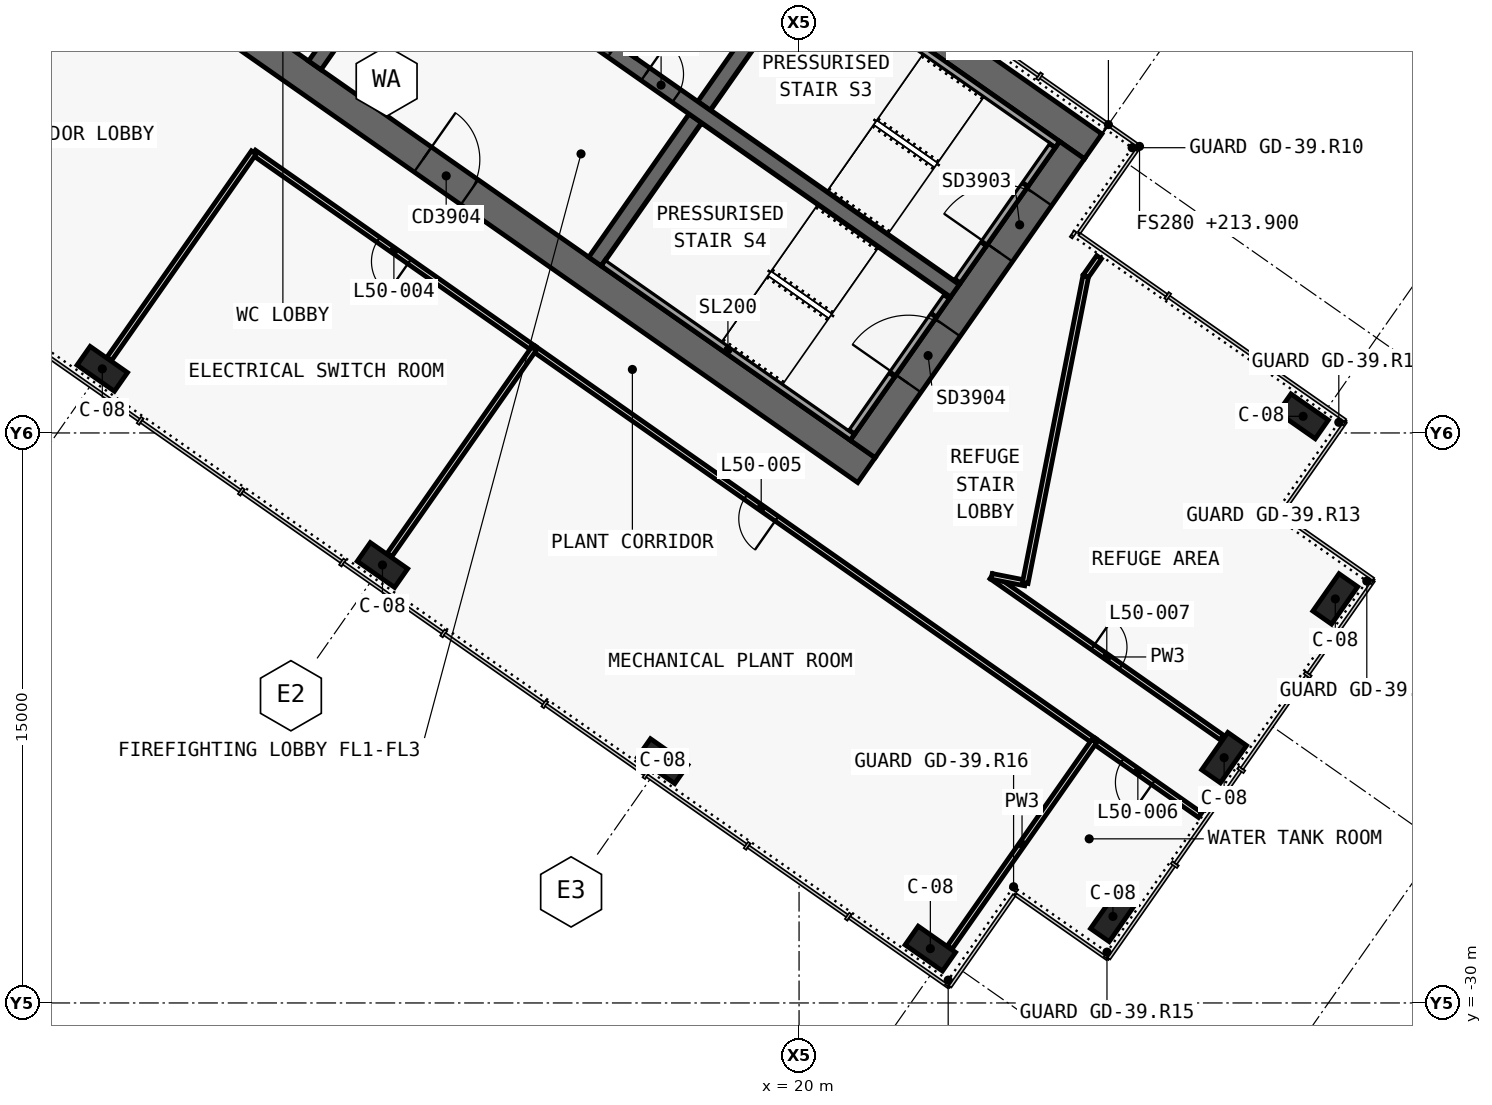
"""IFC4 building model, lengths in metres.
Left out: names, types, materials, properties, quantities, classifications, styles, units other than length and angle.
Written with IfcOpenShell. Run it as: python <this file> out.ifc"""

import sys

from ifc_helpers import new_model, si_unit, direction, frame, frame_2d, origin, origin_2d, place, context, subcontext, project, spatial, polyline, rectangle, outline, extrude, element, fill, save


model = new_model("IFC4")
c1 = context("Model", 3, precision=1e-05, world=origin(), true_north=direction((0.0, 1.0)))
c2 = subcontext(c1, "Body", "Model", "MODEL_VIEW")
j1 = project(units=[si_unit("LENGTHUNIT", "METRE"), si_unit("PLANEANGLEUNIT", "RADIAN")], contexts=[c1])
p1 = place(None, origin())
s1 = spatial("IfcSite", under=j1, at=p1, CompositionType="ELEMENT")
p2 = place(p1, origin())
s2 = spatial("IfcBuilding", under=s1, at=p2, CompositionType="ELEMENT")
p3 = place(p2, frame((0.0, 0.0, 213.9)))
s3 = spatial("IfcBuildingStorey", under=s2, at=p3, CompositionType="ELEMENT", Elevation=213.9)
p4 = place(p3, frame((-0.029, 11.984, 0.0), z_axis=(0.0, 0.0, 1.0), x_axis=(0.819151382952, -0.573577380837, 0.0)))
e1 = element("IfcWall", 1, at=p4, inside=s3, PredefinedType="SHEAR", context=c2, shape_type="SweptSolid", body=[
    extrude(outline(polyline([(33.898, 0.4), (-0.0, 0.4), (0.56, -0.4), (33.898, -0.4), (33.898, 0.4)])), origin(), (0.0, 0.0, 1.0), 5.5),
])
p5 = place(p3, frame((-0.029, -0.712, 0.0), z_axis=(0.0, 0.0, 1.0), x_axis=(0.819151758019, -0.573576845187, 0.0)))
e2 = element("IfcWall", 2, at=p5, inside=s3, PredefinedType="SHEAR", context=c2, shape_type="SweptSolid", body=[
    extrude(outline(polyline([(26.616, 0.4), (-0.0, 0.4), (0.56, -0.4), (26.616, -0.4), (26.616, 0.4)])), origin(), (0.0, 0.0, 1.0), 5.5),
])
p6 = place(p5, frame((1.166, 0.0, 0.0)))
e3 = element("IfcOpeningElement", 3, at=p6, cuts=e2, PredefinedType="OPENING", context=c2, shape_type="SweptSolid", body=[
    extrude(rectangle(XDim=1.5, YDim=2.1, at=frame_2d((0.75, 1.05))), frame((0.0, 0.41, 0.0), z_axis=(0.0, -1.0, 0.0), x_axis=(1.0, 0.0, 0.0)), (0.0, 0.0, 1.0), 0.82),
])
p7 = place(p5, frame((12.366, 0.0, 0.0)))
e4 = element("IfcOpeningElement", 4, at=p7, cuts=e2, PredefinedType="OPENING", context=c2, shape_type="SweptSolid", body=[
    extrude(rectangle(XDim=1.5, YDim=2.1, at=frame_2d((0.75, 1.05))), frame((0.0, 0.41, 0.0), z_axis=(0.0, -1.0, 0.0), x_axis=(1.0, 0.0, 0.0)), (0.0, 0.0, 1.0), 0.82),
])
p8 = place(p3, frame((21.675, -15.421, 0.0), z_axis=(0.0, 0.0, 1.0), x_axis=(0.573581815061, 0.819148278049, 0.0)))
e5 = element("IfcWall", 5, at=p8, inside=s3, PredefinedType="SHEAR", context=c2, shape_type="SweptSolid", body=[
    extrude(outline(polyline([(9.6, 0.4), (0.0, 0.4), (0.0, -0.4), (9.6, -0.4), (9.6, 0.4)])), origin(), (0.0, 0.0, 1.0), 5.5),
])
p9 = place(p8, frame((6.3, 0.0, 0.0)))
e6 = element("IfcOpeningElement", 6, at=p9, cuts=e5, PredefinedType="OPENING", context=c2, shape_type="SweptSolid", body=[
    extrude(rectangle(XDim=1.8, YDim=2.1, at=frame_2d((0.9, 1.05))), frame((0.0, 0.41, 0.0), z_axis=(0.0, -1.0, 0.0), x_axis=(1.0, 0.0, 0.0)), (0.0, 0.0, 1.0), 0.82),
])
p10 = place(p8, frame((2.1, 0.0, 0.0)))
e7 = element("IfcOpeningElement", 7, at=p10, cuts=e5, PredefinedType="OPENING", context=c2, shape_type="SweptSolid", body=[
    extrude(rectangle(XDim=1.8, YDim=2.1, at=frame_2d((0.9, 1.05))), frame((0.0, 0.41, 0.0), z_axis=(0.0, -1.0, 0.0), x_axis=(1.0, 0.0, 0.0)), (0.0, 0.0, 1.0), 0.82),
])
p11 = place(p3, frame((7.258, -5.326, 0.0), z_axis=(0.0, 0.0, 1.0), x_axis=(0.573540709186, 0.819177059558, 0.0)))
e8 = element("IfcWall", 8, at=p11, inside=s3, PredefinedType="SHEAR", context=c2, shape_type="SweptSolid", body=[
    extrude(outline(polyline([(-0.0, 0.2), (-0.0, -0.2), (4.6, -0.2), (4.6, 0.2), (-0.0, 0.2)])), origin(), (0.0, 0.0, 1.0), 5.5),
])
p12 = place(p3, frame((14.63, -10.488, 0.0), z_axis=(0.0, 0.0, 1.0), x_axis=(0.573611936273, 0.819127185829, 0.0)))
e9 = element("IfcWall", 9, at=p12, inside=s3, PredefinedType="SHEAR", context=c2, shape_type="SweptSolid", body=[
    extrude(outline(polyline([(0.0, 0.2), (0.0, -0.2), (4.6, -0.2), (4.6, 0.2), (0.0, 0.2)])), origin(), (0.0, 0.0, 1.0), 5.5),
])
p13 = place(p3, frame((17.498, -6.392, 0.0), z_axis=(0.0, 0.0, 1.0), x_axis=(0.573611936273, 0.819127185829, 0.0)))
e10 = element("IfcWall", 10, at=p13, inside=s3, PredefinedType="SHEAR", context=c2, shape_type="SweptSolid", body=[
    extrude(outline(polyline([(4.6, -0.2), (4.6, 0.2), (0.0, 0.2), (0.0, -0.2), (4.6, -0.2)])), origin(), (0.0, 0.0, 1.0), 5.5),
])
p14 = place(p3, frame((2.638, 3.768, 0.0), z_axis=(0.0, 0.0, 1.0), x_axis=(0.81915267502, -0.573575535572, 0.0)))
e11 = element("IfcWall", 11, at=p14, inside=s3, PredefinedType="SHEAR", context=c2, shape_type="SweptSolid", body=[
    extrude(outline(polyline([(0.0, 0.2), (0.0, -0.2), (26.2, -0.2), (26.2, 0.2), (0.0, 0.2)])), origin(), (0.0, 0.0, 1.0), 5.5),
])
p15 = place(p14, frame((9.637, 0.0, 0.0)))
e12 = element("IfcOpeningElement", 12, at=p15, cuts=e11, PredefinedType="OPENING", context=c2, shape_type="SweptSolid", body=[
    extrude(rectangle(XDim=1.2, YDim=2.1, at=frame_2d((0.6, 1.05))), frame((0.0, 0.21, 0.0), z_axis=(0.0, -1.0, 0.0), x_axis=(1.0, 0.0, 0.0)), (0.0, 0.0, 1.0), 0.42),
])
p16 = place(p14, frame((11.812, 0.0, 0.0)))
e13 = element("IfcOpeningElement", 13, at=p16, cuts=e11, PredefinedType="OPENING", context=c2, shape_type="SweptSolid", body=[
    extrude(rectangle(XDim=1.2, YDim=2.1, at=frame_2d((0.6, 1.05))), frame((0.0, 0.21, 0.0), z_axis=(0.0, -1.0, 0.0), x_axis=(1.0, 0.0, 0.0)), (0.0, 0.0, 1.0), 0.42),
])
p17 = place(p14, frame((13.988, 0.0, 0.0)))
e14 = element("IfcOpeningElement", 14, at=p17, cuts=e11, PredefinedType="OPENING", context=c2, shape_type="SweptSolid", body=[
    extrude(rectangle(XDim=1.2, YDim=2.1, at=frame_2d((0.6, 1.05))), frame((0.0, 0.21, 0.0), z_axis=(0.0, -1.0, 0.0), x_axis=(1.0, 0.0, 0.0)), (0.0, 0.0, 1.0), 0.42),
])
p18 = place(p14, frame((16.262, 0.0, 0.0)))
e15 = element("IfcOpeningElement", 15, at=p18, cuts=e11, PredefinedType="OPENING", context=c2, shape_type="SweptSolid", body=[
    extrude(rectangle(XDim=1.0, YDim=2.1, at=frame_2d((0.5, 1.05))), frame((0.0, 0.21, 0.0), z_axis=(0.0, -1.0, 0.0), x_axis=(1.0, 0.0, 0.0)), (0.0, 0.0, 1.0), 0.42),
])
for number, where, z_axis, x_axis in (
    (16, (1.665, -13.313, 0.0), (0.0, 0.0, 1.0), (0.819, -0.574, 0.0)),
    (17, (9.038, -18.475, 0.0), (0.0, 0.0, 1.0), (0.819, -0.574, 0.0)),
    (18, (16.41, -23.637, 0.0), (0.0, 0.0, 1.0), (0.819, -0.574, 0.0)),
    (19, (23.455, -28.57, 0.0), (0.0, 0.0, 1.0), (0.819, -0.574, 0.0)),
    (20, (33.263, -14.562, 0.0), (0.0, 0.0, 1.0), (0.819, -0.574, 0.0)),
    (21, (28.26, -27.723, 0.0), (0.0, 0.0, 1.0), (0.574, 0.819, 0.0)),
    (22, (31.185, -23.545, 0.0), (0.0, 0.0, 1.0), (0.574, 0.819, 0.0)),
    (23, (34.11, -19.367, 0.0), (0.0, 0.0, 1.0), (0.574, 0.819, 0.0)),
):
    element("IfcColumn", number, at=place(p3, frame(where, z_axis=z_axis, x_axis=x_axis)), inside=s3, PredefinedType="COLUMN", context=c2, shape_type="SweptSolid", body=[
        extrude(rectangle(XDim=1.2, YDim=0.6, at=origin_2d()), origin(), (0.0, 0.0, 1.0), 5.5),
    ])
p19 = place(p3, frame((15.594, -5.059, 0.0), z_axis=(0.0, 0.0, 1.0), x_axis=(0.573540709186, 0.819177059558, 0.0)))
e24 = element("IfcWall", 24, at=p19, inside=s3, PredefinedType="SOLIDWALL", context=c2, shape_type="SweptSolid", body=[
    extrude(rectangle(XDim=4.6, YDim=0.2, at=frame_2d((2.3, 0.0))), origin(), (0.0, 0.0, 1.0), 5.5),
])
p20 = place(p3, frame((20.243, -2.821, 0.0), z_axis=(0.0, 0.0, 1.0), x_axis=(0.819141584393, -0.57359137434, 0.0)))
e25 = element("IfcWall", 25, at=p20, inside=s3, PredefinedType="SOLIDWALL", context=c2, shape_type="SweptSolid", body=[
    extrude(rectangle(XDim=8.0, YDim=0.2, at=frame_2d((4.0, 0.0))), origin(), (0.0, 0.0, 1.0), 5.22),
])
p21 = place(p3, frame((24.162, -10.998, 0.0), z_axis=(0.0, 0.0, 1.0), x_axis=(0.573612502218, 0.819126789514, 0.0)))
e26 = element("IfcWall", 26, at=p21, inside=s3, PredefinedType="SOLIDWALL", context=c2, shape_type="SweptSolid", body=[
    extrude(rectangle(XDim=1.2, YDim=0.2, at=frame_2d((0.6, 0.0))), origin(), (0.0, 0.0, 1.0), 5.22),
])
p22 = place(p3, frame((25.94, -8.458, 0.0), z_axis=(0.0, 0.0, 1.0), x_axis=(0.573619628835, 0.819121798889, 0.0)))
e27 = element("IfcWall", 27, at=p22, inside=s3, PredefinedType="SOLIDWALL", context=c2, shape_type="SweptSolid", body=[
    extrude(rectangle(XDim=1.25, YDim=0.2, at=frame_2d((0.625, 0.0))), origin(), (0.0, 0.0, 1.0), 5.22),
])
p23 = place(p3, frame((24.85, -10.014, 2.15), z_axis=(0.0, 0.0, 1.0), x_axis=(0.573505465124, 0.819201734296, 0.0)))
e28 = element("IfcWall", 28, at=p23, inside=s3, PredefinedType="SOLIDWALL", context=c2, shape_type="SweptSolid", body=[
    extrude(rectangle(XDim=1.9, YDim=0.2, at=frame_2d((0.95, 0.0))), origin(), (0.0, 0.0, 1.0), 3.07),
])
p24 = place(p3, frame((14.851, -10.521, 0.0), z_axis=(0.0, 0.0, 1.0), x_axis=(0.819141584393, -0.57359137434, 0.0)))
e29 = element("IfcWall", 29, at=p24, inside=s3, PredefinedType="SOLIDWALL", context=c2, shape_type="SweptSolid", body=[
    extrude(rectangle(XDim=8.0, YDim=0.2, at=frame_2d((4.0, 0.0))), origin(), (0.0, 0.0, 1.0), 5.22),
])
p25 = place(p3, frame((21.38, -14.97, 0.0), z_axis=(0.0, 0.0, 1.0), x_axis=(0.573559770908, 0.819163713305, 0.0)))
e30 = element("IfcWall", 30, at=p25, inside=s3, PredefinedType="SOLIDWALL", context=c2, shape_type="SweptSolid", body=[
    extrude(rectangle(XDim=1.85, YDim=0.2, at=frame_2d((0.925, 0.0))), origin(), (0.0, 0.0, 1.0), 5.22),
])
p26 = place(p3, frame((23.531, -11.898, 0.0), z_axis=(0.0, 0.0, 1.0), x_axis=(0.573708088123, 0.819059844958, 0.0)))
e31 = element("IfcWall", 31, at=p26, inside=s3, PredefinedType="SOLIDWALL", context=c2, shape_type="SweptSolid", body=[
    extrude(rectangle(XDim=0.6, YDim=0.2, at=frame_2d((0.3, 0.0))), origin(), (0.0, 0.0, 1.0), 5.22),
])
p27 = place(p3, frame((22.441, -13.455, 2.15), z_axis=(0.0, 0.0, 1.0), x_axis=(0.573591692345, 0.819141361715, 0.0)))
e32 = element("IfcWall", 32, at=p27, inside=s3, PredefinedType="SOLIDWALL", context=c2, shape_type="SweptSolid", body=[
    extrude(rectangle(XDim=1.9, YDim=0.2, at=frame_2d((0.95, 0.0))), origin(), (0.0, 0.0, 1.0), 3.07),
])
p28 = place(p3, frame((25.067, -18.773, 0.0), z_axis=(0.0, 0.0, 1.0), x_axis=(0.819155947171, -0.573570862417, 0.0)))
e33 = element("IfcWall", 33, at=p28, inside=s3, PredefinedType="PARTITIONING", context=c2, shape_type="SweptSolid", body=[
    extrude(rectangle(XDim=7.398, YDim=0.15, at=frame_2d((3.699, 0.0))), origin(), (0.0, 0.0, 1.0), 4.65),
])
p29 = place(p28, frame((3.249, 0.0, 0.0)))
e34 = element("IfcOpeningElement", 34, at=p29, cuts=e33, PredefinedType="OPENING", context=c2, shape_type="SweptSolid", body=[
    extrude(rectangle(XDim=0.9, YDim=2.1, at=frame_2d((0.45, 1.05))), frame((0.0, 0.085, 0.0), z_axis=(0.0, -1.0, 0.0), x_axis=(1.0, 0.0, 0.0)), (0.0, 0.0, 1.0), 0.17),
])
p30 = place(p3, frame((13.026, -12.783, 0.0), z_axis=(0.0, 0.0, 1.0), x_axis=(-0.81915291695, 0.57357519006, 0.0)))
e35 = element("IfcWall", 35, at=p30, inside=s3, PredefinedType="PARTITIONING", context=c2, shape_type="SweptSolid", body=[
    extrude(rectangle(XDim=9.002, YDim=0.15, at=frame_2d((4.501, 0.0))), origin(), (0.0, 0.0, 1.0), 4.65),
])
p31 = place(p30, frame((4.001, 0.0, 0.0)))
e36 = element("IfcOpeningElement", 36, at=p31, cuts=e35, PredefinedType="OPENING", context=c2, shape_type="SweptSolid", body=[
    extrude(rectangle(XDim=1.0, YDim=2.1, at=frame_2d((0.5, 1.05))), frame((0.0, 0.085, 0.0), z_axis=(0.0, -1.0, 0.0), x_axis=(1.0, 0.0, 0.0)), (0.0, 0.0, 1.0), 0.17),
])
p32 = place(p3, frame((27.771, -23.107, 0.0), z_axis=(0.0, 0.0, 1.0), x_axis=(-0.81915291695, 0.57357519006, 0.0)))
e37 = element("IfcWall", 37, at=p32, inside=s3, PredefinedType="PARTITIONING", context=c2, shape_type="SweptSolid", body=[
    extrude(rectangle(XDim=18.004, YDim=0.15, at=frame_2d((9.002, 0.0))), origin(), (0.0, 0.0, 1.0), 4.65),
])
p33 = place(p32, frame((10.202, 0.0, 0.0)))
e38 = element("IfcOpeningElement", 38, at=p33, cuts=e37, PredefinedType="OPENING", context=c2, shape_type="SweptSolid", body=[
    extrude(rectangle(XDim=1.0, YDim=2.1, at=frame_2d((0.5, 1.05))), frame((0.0, 0.085, 0.0), z_axis=(0.0, -1.0, 0.0), x_axis=(1.0, 0.0, 0.0)), (0.0, 0.0, 1.0), 0.17),
])
p34 = place(p3, frame((30.554, -25.056, 0.0), z_axis=(0.0, 0.0, 1.0), x_axis=(-0.819147629048, 0.573582741917, 0.0)))
e39 = element("IfcWall", 39, at=p34, inside=s3, PredefinedType="PARTITIONING", context=c2, shape_type="SweptSolid", body=[
    extrude(rectangle(XDim=3.402, YDim=0.15, at=frame_2d((1.701, 0.0))), origin(), (0.0, 0.0, 1.0), 4.6),
])
p35 = place(p34, frame((1.501, 0.0, 0.0)))
e40 = element("IfcOpeningElement", 40, at=p35, cuts=e39, PredefinedType="OPENING", context=c2, shape_type="SweptSolid", body=[
    extrude(rectangle(XDim=1.0, YDim=2.1, at=frame_2d((0.5, 1.05))), frame((0.0, 0.085, 0.0), z_axis=(0.0, -1.0, 0.0), x_axis=(1.0, 0.0, 0.0)), (0.0, 0.0, 1.0), 0.17),
])
p36 = place(p3, frame((25.069, -18.774, 0.0), z_axis=(0.0, 0.0, 1.0), x_axis=(0.98111942846, -0.193402862176, 0.0)))
e41 = element("IfcWall", 41, at=p36, inside=s3, PredefinedType="PARTITIONING", context=c2, shape_type="SweptSolid", body=[
    extrude(rectangle(XDim=0.9, YDim=0.15, at=frame_2d((0.45, 0.0))), origin(), (0.0, 0.0, 1.0), 5.22),
])
p37 = place(p3, frame((25.952, -18.948, 0.0), z_axis=(0.0, 0.0, 1.0), x_axis=(0.193416593328, 0.981116721611, 0.0)))
e42 = element("IfcWall", 42, at=p37, inside=s3, PredefinedType="PARTITIONING", context=c2, shape_type="SweptSolid", body=[
    extrude(rectangle(XDim=8.229, YDim=0.15, at=frame_2d((4.114, 0.0))), origin(), (0.0, 0.0, 1.0), 5.22),
])
p38 = place(p3, frame((27.543, -10.875, 0.0), z_axis=(0.0, 0.0, 1.0), x_axis=(0.573489203237, 0.819213118651, 0.0)))
e43 = element("IfcWall", 43, at=p38, inside=s3, PredefinedType="PARTITIONING", context=c2, shape_type="SweptSolid", body=[
    extrude(rectangle(XDim=0.61, YDim=0.15, at=frame_2d((0.305, 0.0))), origin(), (0.0, 0.0, 1.0), 4.65),
])
p39 = place(p3, frame((13.024, -12.782, 0.0), z_axis=(0.0, 0.0, 1.0), x_axis=(-0.573556251799, -0.819166177294, 0.0)))
e44 = element("IfcWall", 44, at=p39, inside=s3, PredefinedType="PARTITIONING", context=c2, shape_type="SweptSolid", body=[
    extrude(rectangle(XDim=6.63, YDim=0.15, at=frame_2d((3.315, 0.0))), origin(), (0.0, 0.0, 1.0), 4.65),
])
p40 = place(p3, frame((1.849, -13.051, 0.0), z_axis=(0.0, 0.0, 1.0), x_axis=(0.57357355307, 0.819154063177, 0.0)))
e45 = element("IfcWall", 45, at=p40, inside=s3, PredefinedType="PARTITIONING", context=c2, shape_type="SweptSolid", body=[
    extrude(rectangle(XDim=6.63, YDim=0.15, at=frame_2d((3.315, 0.0))), origin(), (0.0, 0.0, 1.0), 4.65),
])
p41 = place(p3, frame((27.769, -23.106, 0.0), z_axis=(0.0, 0.0, 1.0), x_axis=(-0.57359826181, -0.819136761505, 0.0)))
e46 = element("IfcWall", 46, at=p41, inside=s3, PredefinedType="PARTITIONING", context=c2, shape_type="SweptSolid", body=[
    extrude(rectangle(XDim=6.63, YDim=0.15, at=frame_2d((3.315, 0.0))), origin(), (0.0, 0.0, 1.0), 4.6),
])
p42 = place(p18, origin())
e47 = element("IfcDoor", 47, at=p42, inside=s3, OperationType="SINGLE_SWING_RIGHT", PredefinedType="DOOR", context=c2, shape_type="SweptSolid", body=[
    extrude(rectangle(XDim=1.0, YDim=2.1, at=frame_2d((0.5, 1.05))), frame((0.0, 0.025, 0.0), z_axis=(0.0, -1.0, 0.0), x_axis=(1.0, 0.0, 0.0)), (0.0, 0.0, 1.0), 0.05),
])
fill(e15, e47)
p43 = place(p7, origin())
e48 = element("IfcDoor", 48, at=p43, inside=s3, OperationType="DOUBLE_DOOR_SINGLE_SWING", PredefinedType="DOOR", context=c2, shape_type="SweptSolid", body=[
    extrude(rectangle(XDim=1.5, YDim=2.1, at=frame_2d((0.75, 1.05))), frame((0.0, 0.025, 0.0), z_axis=(0.0, -1.0, 0.0), x_axis=(1.0, 0.0, 0.0)), (0.0, 0.0, 1.0), 0.05),
])
fill(e4, e48)
p44 = place(p9, origin())
e49 = element("IfcDoor", 49, at=p44, inside=s3, OperationType="DOUBLE_DOOR_SINGLE_SWING", PredefinedType="DOOR", context=c2, shape_type="SweptSolid", body=[
    extrude(rectangle(XDim=1.8, YDim=2.1, at=frame_2d((0.9, 1.05))), frame((0.0, 0.025, 0.0), z_axis=(0.0, -1.0, 0.0), x_axis=(1.0, 0.0, 0.0)), (0.0, 0.0, 1.0), 0.05),
])
fill(e6, e49)
p45 = place(p10, origin())
e50 = element("IfcDoor", 50, at=p45, inside=s3, OperationType="DOUBLE_DOOR_SINGLE_SWING", PredefinedType="DOOR", context=c2, shape_type="SweptSolid", body=[
    extrude(rectangle(XDim=1.8, YDim=2.1, at=frame_2d((0.9, 1.05))), frame((0.0, 0.025, 0.0), z_axis=(0.0, -1.0, 0.0), x_axis=(1.0, 0.0, 0.0)), (0.0, 0.0, 1.0), 0.05),
])
fill(e7, e50)
p46 = place(p31, origin())
e51 = element("IfcDoor", 51, at=p46, inside=s3, OperationType="SINGLE_SWING_LEFT", PredefinedType="DOOR", context=c2, shape_type="SweptSolid", body=[
    extrude(rectangle(XDim=1.0, YDim=2.1, at=frame_2d((0.5, 1.05))), frame((0.0, 0.025, 0.0), z_axis=(0.0, -1.0, 0.0), x_axis=(1.0, 0.0, 0.0)), (0.0, 0.0, 1.0), 0.05),
])
fill(e36, e51)
p47 = place(p33, origin())
e52 = element("IfcDoor", 52, at=p47, inside=s3, OperationType="SINGLE_SWING_RIGHT", PredefinedType="DOOR", context=c2, shape_type="SweptSolid", body=[
    extrude(rectangle(XDim=1.0, YDim=2.1, at=frame_2d((0.5, 1.05))), frame((0.0, 0.025, 0.0), z_axis=(0.0, -1.0, 0.0), x_axis=(1.0, 0.0, 0.0)), (0.0, 0.0, 1.0), 0.05),
])
fill(e38, e52)
p48 = place(p35, origin())
e53 = element("IfcDoor", 53, at=p48, inside=s3, OperationType="SINGLE_SWING_RIGHT", PredefinedType="DOOR", context=c2, shape_type="SweptSolid", body=[
    extrude(rectangle(XDim=1.0, YDim=2.1, at=frame_2d((0.5, 1.05))), frame((0.0, 0.025, 0.0), z_axis=(0.0, -1.0, 0.0), x_axis=(1.0, 0.0, 0.0)), (0.0, 0.0, 1.0), 0.05),
])
fill(e40, e53)
p49 = place(p29, origin())
e54 = element("IfcDoor", 54, at=p49, inside=s3, OperationType="SINGLE_SWING_RIGHT", PredefinedType="DOOR", context=c2, shape_type="SweptSolid", body=[
    extrude(rectangle(XDim=0.9, YDim=2.1, at=frame_2d((0.45, 1.05))), frame((0.0, 0.025, 0.0), z_axis=(0.0, -1.0, 0.0), x_axis=(1.0, 0.0, 0.0)), (0.0, 0.0, 1.0), 0.05),
])
fill(e34, e54)
save(model, sys.argv[1])
